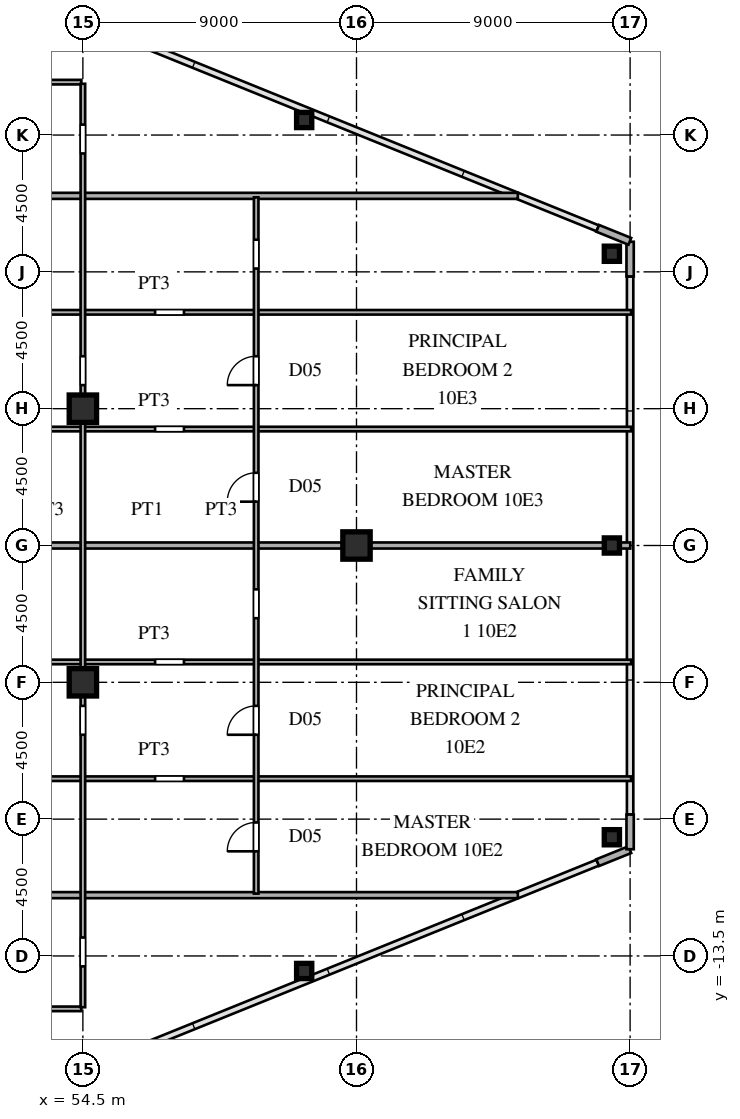
"""IFC4 building model, lengths in metres.
Left out: names, types, materials, properties, quantities, classifications, styles, units other than length and angle.
Written with IfcOpenShell. Run it as: python <this file> out.ifc"""

import sys

from ifc_helpers import new_model, si_unit, direction, frame, frame_2d, origin, origin_2d, place, context, subcontext, project, spatial, rectangle, hollow_rectangle, i_section, extrude, source, transform, mapped, element, fill, save


model = new_model("IFC4")
c1 = context("Model", 3, precision=1e-05, world=origin(), true_north=direction((0.0, 1.0)))
c2 = subcontext(c1, "Body", "Model", "MODEL_VIEW")
j1 = project(units=[si_unit("LENGTHUNIT", "METRE"), si_unit("PLANEANGLEUNIT", "RADIAN")], contexts=[c1])
p1 = place(None, origin())
s1 = spatial("IfcSite", under=j1, at=p1, CompositionType="ELEMENT")
p2 = place(p1, origin())
s2 = spatial("IfcBuilding", under=s1, at=p2, CompositionType="ELEMENT")
p3 = place(p2, frame((0.0, 0.0, 40.5)))
s3 = spatial("IfcBuildingStorey", under=s2, at=p3, CompositionType="ELEMENT", Elevation=40.5)
m1 = source(origin(), c2, "Body", "SweptSolid", [
    extrude(i_section(OverallWidth=0.9, OverallDepth=0.9, WebThickness=0.036, FlangeThickness=0.055, at=origin_2d()), origin(), (0.0, 0.0, 1.0), 3.6),
])
for number, where, z_axis, x_axis in (
    (1, (54.5, -4.5, 0.0), (0.0, 0.0, 1.0), (1.0, 0.0, 0.0)),
    (2, (54.5, 4.5, 0.0), (0.0, 0.0, 1.0), (1.0, 0.0, 0.0)),
    (3, (63.5, 0.0, 0.0), (0.0, 0.0, 1.0), (1.0, 0.0, 0.0)),
):
    element("IfcColumn", number, at=place(p3, frame(where, z_axis=z_axis, x_axis=x_axis)), inside=s3, PredefinedType="COLUMN", context=c2, shape_type="MappedRepresentation", body=[
        mapped(m1, transform((0.0, 0.0, 0.0), scale=1.0)),
    ])
m2 = source(origin(), c2, "Body", "SweptSolid", [
    extrude(hollow_rectangle(XDim=0.5, YDim=0.5, WallThickness=0.02, at=origin_2d()), origin(), (0.0, 0.0, 1.0), 3.6),
])
for number, where, z_axis, x_axis in (
    (4, (71.9, -9.596, 0.0), (0.0, 0.0, 1.0), (1.0, 0.0, 0.0)),
    (5, (71.9, 9.596, 0.0), (0.0, 0.0, 1.0), (1.0, 0.0, 0.0)),
    (6, (61.779, -13.994, 0.0), (0.0, 0.0, 1.0), (1.0, 0.0, 0.0)),
    (7, (61.779, 13.994, 0.0), (0.0, 0.0, 1.0), (1.0, 0.0, 0.0)),
    (8, (71.9, 0.0, 0.0), (0.0, 0.0, 1.0), (1.0, 0.0, 0.0)),
):
    element("IfcColumn", number, at=place(p3, frame(where, z_axis=z_axis, x_axis=x_axis)), inside=s3, PredefinedType="COLUMN", context=c2, shape_type="MappedRepresentation", body=[
        mapped(m2, transform((0.0, 0.0, 0.0), scale=1.0)),
    ])
for number, where, z_axis, x_axis in (
    (9, (71.434, -10.431, 0.0), (0.0, 0.0, 1.0), (0.927, 0.375, 0.0)),
    (10, (72.5, -9.99, 0.0), (0.0, 0.0, 1.0), (0.0, 1.0, 0.0)),
    (11, (72.5, 8.85, 0.0), (0.0, 0.0, 1.0), (0.0, 1.0, 0.0)),
    (12, (72.491, 10.004, 0.0), (0.0, 0.0, 1.0), (-0.927, 0.375, 0.0)),
):
    element("IfcWall", number, at=place(p3, frame(where, z_axis=z_axis, x_axis=x_axis)), inside=s3, PredefinedType="SOLIDWALL", context=c2, shape_type="SweptSolid", body=[
        extrude(rectangle(XDim=1.14, YDim=0.24, at=frame_2d((0.57, 0.0))), origin(), (0.0, 0.0, 1.0), 3.38),
    ])
p4 = place(p3, frame((41.15, -15.24, 0.0), z_axis=(0.0, 0.0, 1.0), x_axis=(1.0, 0.0, 0.0)))
e13 = element("IfcWall", 13, at=p4, inside=s3, PredefinedType="PARTITIONING", context=c2, shape_type="SweptSolid", body=[
    extrude(rectangle(XDim=13.3, YDim=0.15, at=frame_2d((6.65, 0.0))), origin(), (0.0, 0.0, 1.0), 3.38),
])
p5 = place(p4, frame((6.175, 0.0, 0.0)))
e14 = element("IfcOpeningElement", 14, at=p5, cuts=e13, PredefinedType="OPENING", context=c2, shape_type="SweptSolid", body=[
    extrude(rectangle(XDim=0.95, YDim=2.15, at=frame_2d((0.475, 1.075))), frame((0.0, 0.085, 0.0), z_axis=(0.0, -1.0, 0.0), x_axis=(1.0, 0.0, 0.0)), (0.0, 0.0, 1.0), 0.17),
])
p6 = place(p3, frame((38.43, -11.5, 0.0), z_axis=(0.0, 0.0, 1.0), x_axis=(1.0, 0.0, 0.0)))
e15 = element("IfcWall", 15, at=p6, inside=s3, PredefinedType="PARTITIONING", context=c2, shape_type="SweptSolid", body=[
    extrude(rectangle(XDim=30.377, YDim=0.2, at=frame_2d((15.188, 0.0))), origin(), (0.0, 0.0, 1.0), 3.38),
])
p7 = place(p3, frame((41.15, -7.67, 0.0), z_axis=(0.0, 0.0, 1.0), x_axis=(1.0, 0.0, 0.0)))
e16 = element("IfcWall", 16, at=p7, inside=s3, PredefinedType="PARTITIONING", context=c2, shape_type="SweptSolid", body=[
    extrude(rectangle(XDim=31.385, YDim=0.15, at=frame_2d((15.692, 0.0))), origin(), (0.0, 0.0, 1.0), 3.38),
])
p8 = place(p7, frame((6.175, 0.0, 0.0)))
e17 = element("IfcOpeningElement", 17, at=p8, cuts=e16, PredefinedType="OPENING", context=c2, shape_type="SweptSolid", body=[
    extrude(rectangle(XDim=0.95, YDim=2.15, at=frame_2d((0.475, 1.075))), frame((0.0, 0.085, 0.0), z_axis=(0.0, -1.0, 0.0), x_axis=(1.0, 0.0, 0.0)), (0.0, 0.0, 1.0), 0.17),
])
p9 = place(p7, frame((15.725, 0.0, 0.0)))
e18 = element("IfcOpeningElement", 18, at=p9, cuts=e16, PredefinedType="OPENING", context=c2, shape_type="SweptSolid", body=[
    extrude(rectangle(XDim=0.95, YDim=2.15, at=frame_2d((0.475, 1.075))), frame((0.0, 0.085, 0.0), z_axis=(0.0, -1.0, 0.0), x_axis=(1.0, 0.0, 0.0)), (0.0, 0.0, 1.0), 0.17),
])
p10 = place(p3, frame((41.15, -3.83, 0.0), z_axis=(0.0, 0.0, 1.0), x_axis=(1.0, 0.0, 0.0)))
e19 = element("IfcWall", 19, at=p10, inside=s3, PredefinedType="PARTITIONING", context=c2, shape_type="SweptSolid", body=[
    extrude(rectangle(XDim=31.385, YDim=0.15, at=frame_2d((15.692, 0.0))), origin(), (0.0, 0.0, 1.0), 3.38),
])
p11 = place(p10, frame((6.175, 0.0, 0.0)))
e20 = element("IfcOpeningElement", 20, at=p11, cuts=e19, PredefinedType="OPENING", context=c2, shape_type="SweptSolid", body=[
    extrude(rectangle(XDim=0.95, YDim=2.15, at=frame_2d((0.475, 1.075))), frame((0.0, 0.085, 0.0), z_axis=(0.0, -1.0, 0.0), x_axis=(1.0, 0.0, 0.0)), (0.0, 0.0, 1.0), 0.17),
])
p12 = place(p10, frame((15.725, 0.0, 0.0)))
e21 = element("IfcOpeningElement", 21, at=p12, cuts=e19, PredefinedType="OPENING", context=c2, shape_type="SweptSolid", body=[
    extrude(rectangle(XDim=0.95, YDim=2.15, at=frame_2d((0.475, 1.075))), frame((0.0, 0.085, 0.0), z_axis=(0.0, -1.0, 0.0), x_axis=(1.0, 0.0, 0.0)), (0.0, 0.0, 1.0), 0.17),
])
p13 = place(p3, frame((38.43, 0.0, 0.0), z_axis=(0.0, 0.0, 1.0), x_axis=(1.0, 0.0, 0.0)))
e22 = element("IfcWall", 22, at=p13, inside=s3, PredefinedType="PARTITIONING", context=c2, shape_type="SweptSolid", body=[
    extrude(rectangle(XDim=25.05, YDim=0.2, at=frame_2d((12.525, 0.0))), origin(), (0.0, 0.0, 1.0), 3.38),
])
p14 = place(p3, frame((63.48, 0.0, 0.0), z_axis=(0.0, 0.0, 1.0), x_axis=(1.0, 0.0, 0.0)))
e23 = element("IfcWall", 23, at=p14, inside=s3, PredefinedType="PARTITIONING", context=c2, shape_type="SweptSolid", body=[
    extrude(rectangle(XDim=9.025, YDim=0.2, at=frame_2d((4.512, 0.0))), origin(), (0.0, 0.0, 1.0), 2.68),
])
p15 = place(p3, frame((41.15, 3.83, 0.0), z_axis=(0.0, 0.0, 1.0), x_axis=(1.0, 0.0, 0.0)))
e24 = element("IfcWall", 24, at=p15, inside=s3, PredefinedType="PARTITIONING", context=c2, shape_type="SweptSolid", body=[
    extrude(rectangle(XDim=31.385, YDim=0.15, at=frame_2d((15.692, 0.0))), origin(), (0.0, 0.0, 1.0), 3.38),
])
p16 = place(p15, frame((6.175, 0.0, 0.0)))
e25 = element("IfcOpeningElement", 25, at=p16, cuts=e24, PredefinedType="OPENING", context=c2, shape_type="SweptSolid", body=[
    extrude(rectangle(XDim=0.95, YDim=2.15, at=frame_2d((0.475, 1.075))), frame((0.0, 0.085, 0.0), z_axis=(0.0, -1.0, 0.0), x_axis=(1.0, 0.0, 0.0)), (0.0, 0.0, 1.0), 0.17),
])
p17 = place(p15, frame((15.725, 0.0, 0.0)))
e26 = element("IfcOpeningElement", 26, at=p17, cuts=e24, PredefinedType="OPENING", context=c2, shape_type="SweptSolid", body=[
    extrude(rectangle(XDim=0.95, YDim=2.15, at=frame_2d((0.475, 1.075))), frame((0.0, 0.085, 0.0), z_axis=(0.0, -1.0, 0.0), x_axis=(1.0, 0.0, 0.0)), (0.0, 0.0, 1.0), 0.17),
])
p18 = place(p3, frame((41.15, 7.67, 0.0), z_axis=(0.0, 0.0, 1.0), x_axis=(1.0, 0.0, 0.0)))
e27 = element("IfcWall", 27, at=p18, inside=s3, PredefinedType="PARTITIONING", context=c2, shape_type="SweptSolid", body=[
    extrude(rectangle(XDim=31.385, YDim=0.15, at=frame_2d((15.692, 0.0))), origin(), (0.0, 0.0, 1.0), 3.38),
])
p19 = place(p18, frame((6.175, 0.0, 0.0)))
e28 = element("IfcOpeningElement", 28, at=p19, cuts=e27, PredefinedType="OPENING", context=c2, shape_type="SweptSolid", body=[
    extrude(rectangle(XDim=0.95, YDim=2.15, at=frame_2d((0.475, 1.075))), frame((0.0, 0.085, 0.0), z_axis=(0.0, -1.0, 0.0), x_axis=(1.0, 0.0, 0.0)), (0.0, 0.0, 1.0), 0.17),
])
p20 = place(p18, frame((15.725, 0.0, 0.0)))
e29 = element("IfcOpeningElement", 29, at=p20, cuts=e27, PredefinedType="OPENING", context=c2, shape_type="SweptSolid", body=[
    extrude(rectangle(XDim=0.95, YDim=2.15, at=frame_2d((0.475, 1.075))), frame((0.0, 0.085, 0.0), z_axis=(0.0, -1.0, 0.0), x_axis=(1.0, 0.0, 0.0)), (0.0, 0.0, 1.0), 0.17),
])
p21 = place(p3, frame((38.43, 11.5, 0.0), z_axis=(0.0, 0.0, 1.0), x_axis=(1.0, 0.0, 0.0)))
e30 = element("IfcWall", 30, at=p21, inside=s3, PredefinedType="PARTITIONING", context=c2, shape_type="SweptSolid", body=[
    extrude(rectangle(XDim=30.377, YDim=0.2, at=frame_2d((15.188, 0.0))), origin(), (0.0, 0.0, 1.0), 3.38),
])
p22 = place(p3, frame((41.15, 15.24, 0.0), z_axis=(0.0, 0.0, 1.0), x_axis=(1.0, 0.0, 0.0)))
e31 = element("IfcWall", 31, at=p22, inside=s3, PredefinedType="PARTITIONING", context=c2, shape_type="SweptSolid", body=[
    extrude(rectangle(XDim=13.3, YDim=0.15, at=frame_2d((6.65, 0.0))), origin(), (0.0, 0.0, 1.0), 3.38),
])
p23 = place(p22, frame((6.175, 0.0, 0.0)))
e32 = element("IfcOpeningElement", 32, at=p23, cuts=e31, PredefinedType="OPENING", context=c2, shape_type="SweptSolid", body=[
    extrude(rectangle(XDim=0.95, YDim=2.15, at=frame_2d((0.475, 1.075))), frame((0.0, 0.085, 0.0), z_axis=(0.0, -1.0, 0.0), x_axis=(1.0, 0.0, 0.0)), (0.0, 0.0, 1.0), 0.17),
])
p24 = place(p3, frame((54.5, -15.186, 0.0), z_axis=(0.0, 0.0, 1.0), x_axis=(0.0, 1.0, 0.0)))
e33 = element("IfcWall", 33, at=p24, inside=s3, PredefinedType="PARTITIONING", context=c2, shape_type="SweptSolid", body=[
    extrude(rectangle(XDim=30.372, YDim=0.15, at=frame_2d((15.186, 0.0))), origin(), (0.0, 0.0, 1.0), 2.68),
])
p25 = place(p24, frame((1.343, 0.0, 0.0)))
e34 = element("IfcOpeningElement", 34, at=p25, cuts=e33, PredefinedType="OPENING", context=c2, shape_type="SweptSolid", body=[
    extrude(rectangle(XDim=0.95, YDim=2.15, at=frame_2d((0.475, 1.075))), frame((0.0, 0.085, 0.0), z_axis=(0.0, -1.0, 0.0), x_axis=(1.0, 0.0, 0.0)), (0.0, 0.0, 1.0), 0.17),
])
p26 = place(p24, frame((8.961, 0.0, 0.0)))
e35 = element("IfcOpeningElement", 35, at=p26, cuts=e33, PredefinedType="OPENING", context=c2, shape_type="SweptSolid", body=[
    extrude(rectangle(XDim=0.95, YDim=2.15, at=frame_2d((0.475, 1.075))), frame((0.0, 0.085, 0.0), z_axis=(0.0, -1.0, 0.0), x_axis=(1.0, 0.0, 0.0)), (0.0, 0.0, 1.0), 0.17),
])
p27 = place(p24, frame((20.461, 0.0, 0.0)))
e36 = element("IfcOpeningElement", 36, at=p27, cuts=e33, PredefinedType="OPENING", context=c2, shape_type="SweptSolid", body=[
    extrude(rectangle(XDim=0.95, YDim=2.15, at=frame_2d((0.475, 1.075))), frame((0.0, 0.085, 0.0), z_axis=(0.0, -1.0, 0.0), x_axis=(1.0, 0.0, 0.0)), (0.0, 0.0, 1.0), 0.17),
])
p28 = place(p24, frame((28.079, 0.0, 0.0)))
e37 = element("IfcOpeningElement", 37, at=p28, cuts=e33, PredefinedType="OPENING", context=c2, shape_type="SweptSolid", body=[
    extrude(rectangle(XDim=0.95, YDim=2.15, at=frame_2d((0.475, 1.075))), frame((0.0, 0.085, 0.0), z_axis=(0.0, -1.0, 0.0), x_axis=(1.0, 0.0, 0.0)), (0.0, 0.0, 1.0), 0.17),
])
p29 = place(p3, frame((60.2, -11.45, 0.0), z_axis=(0.0, 0.0, 1.0), x_axis=(0.0, 1.0, 0.0)))
e38 = element("IfcWall", 38, at=p29, inside=s3, PredefinedType="PARTITIONING", context=c2, shape_type="SweptSolid", body=[
    extrude(rectangle(XDim=22.9, YDim=0.15, at=frame_2d((11.45, 0.0))), origin(), (0.0, 0.0, 1.0), 3.38),
])
p30 = place(p29, frame((1.392, 0.0, 0.0)))
e39 = element("IfcOpeningElement", 39, at=p30, cuts=e38, PredefinedType="OPENING", context=c2, shape_type="SweptSolid", body=[
    extrude(rectangle(XDim=0.95, YDim=2.15, at=frame_2d((0.475, 1.075))), frame((0.0, 0.085, 0.0), z_axis=(0.0, -1.0, 0.0), x_axis=(1.0, 0.0, 0.0)), (0.0, 0.0, 1.0), 0.17),
])
p31 = place(p29, frame((5.225, 0.0, 0.0)))
e40 = element("IfcOpeningElement", 40, at=p31, cuts=e38, PredefinedType="OPENING", context=c2, shape_type="SweptSolid", body=[
    extrude(rectangle(XDim=0.95, YDim=2.15, at=frame_2d((0.475, 1.075))), frame((0.0, 0.085, 0.0), z_axis=(0.0, -1.0, 0.0), x_axis=(1.0, 0.0, 0.0)), (0.0, 0.0, 1.0), 0.17),
])
p32 = place(p29, frame((9.058, 0.0, 0.0)))
e41 = element("IfcOpeningElement", 41, at=p32, cuts=e38, PredefinedType="OPENING", context=c2, shape_type="SweptSolid", body=[
    extrude(rectangle(XDim=0.95, YDim=2.15, at=frame_2d((0.475, 1.075))), frame((0.0, 0.085, 0.0), z_axis=(0.0, -1.0, 0.0), x_axis=(1.0, 0.0, 0.0)), (0.0, 0.0, 1.0), 0.17),
])
p33 = place(p29, frame((12.892, 0.0, 0.0)))
e42 = element("IfcOpeningElement", 42, at=p33, cuts=e38, PredefinedType="OPENING", context=c2, shape_type="SweptSolid", body=[
    extrude(rectangle(XDim=0.95, YDim=2.15, at=frame_2d((0.475, 1.075))), frame((0.0, 0.085, 0.0), z_axis=(0.0, -1.0, 0.0), x_axis=(1.0, 0.0, 0.0)), (0.0, 0.0, 1.0), 0.17),
])
p34 = place(p29, frame((16.725, 0.0, 0.0)))
e43 = element("IfcOpeningElement", 43, at=p34, cuts=e38, PredefinedType="OPENING", context=c2, shape_type="SweptSolid", body=[
    extrude(rectangle(XDim=0.95, YDim=2.15, at=frame_2d((0.475, 1.075))), frame((0.0, 0.085, 0.0), z_axis=(0.0, -1.0, 0.0), x_axis=(1.0, 0.0, 0.0)), (0.0, 0.0, 1.0), 0.17),
])
p35 = place(p29, frame((20.558, 0.0, 0.0)))
e44 = element("IfcOpeningElement", 44, at=p35, cuts=e38, PredefinedType="OPENING", context=c2, shape_type="SweptSolid", body=[
    extrude(rectangle(XDim=0.95, YDim=2.15, at=frame_2d((0.475, 1.075))), frame((0.0, 0.085, 0.0), z_axis=(0.0, -1.0, 0.0), x_axis=(1.0, 0.0, 0.0)), (0.0, 0.0, 1.0), 0.17),
])
m3 = source(origin(), c2, "Body", "SweptSolid", [
    extrude(rectangle(XDim=0.95, YDim=2.15, at=frame_2d((0.475, 1.075))), frame((0.0, 0.025, 0.0), z_axis=(0.0, -1.0, 0.0), x_axis=(1.0, 0.0, 0.0)), (0.0, 0.0, 1.0), 0.05),
])
p36 = place(p30, origin())
e45 = element("IfcDoor", 45, at=p36, inside=s3, OperationType="SINGLE_SWING_LEFT", PredefinedType="DOOR", context=c2, shape_type="MappedRepresentation", body=[
    mapped(m3, transform((0.0, 0.0, 0.0), scale=1.0)),
])
fill(e39, e45)
p37 = place(p31, origin())
e46 = element("IfcDoor", 46, at=p37, inside=s3, OperationType="SINGLE_SWING_LEFT", PredefinedType="DOOR", context=c2, shape_type="MappedRepresentation", body=[
    mapped(m3, transform((0.0, 0.0, 0.0), scale=1.0)),
])
fill(e40, e46)
p38 = place(p33, origin())
e47 = element("IfcDoor", 47, at=p38, inside=s3, OperationType="SINGLE_SWING_LEFT", PredefinedType="DOOR", context=c2, shape_type="MappedRepresentation", body=[
    mapped(m3, transform((0.0, 0.0, 0.0), scale=1.0)),
])
fill(e42, e47)
p39 = place(p34, origin())
e48 = element("IfcDoor", 48, at=p39, inside=s3, OperationType="SINGLE_SWING_LEFT", PredefinedType="DOOR", context=c2, shape_type="MappedRepresentation", body=[
    mapped(m3, transform((0.0, 0.0, 0.0), scale=1.0)),
])
fill(e43, e48)
save(model, sys.argv[1])
